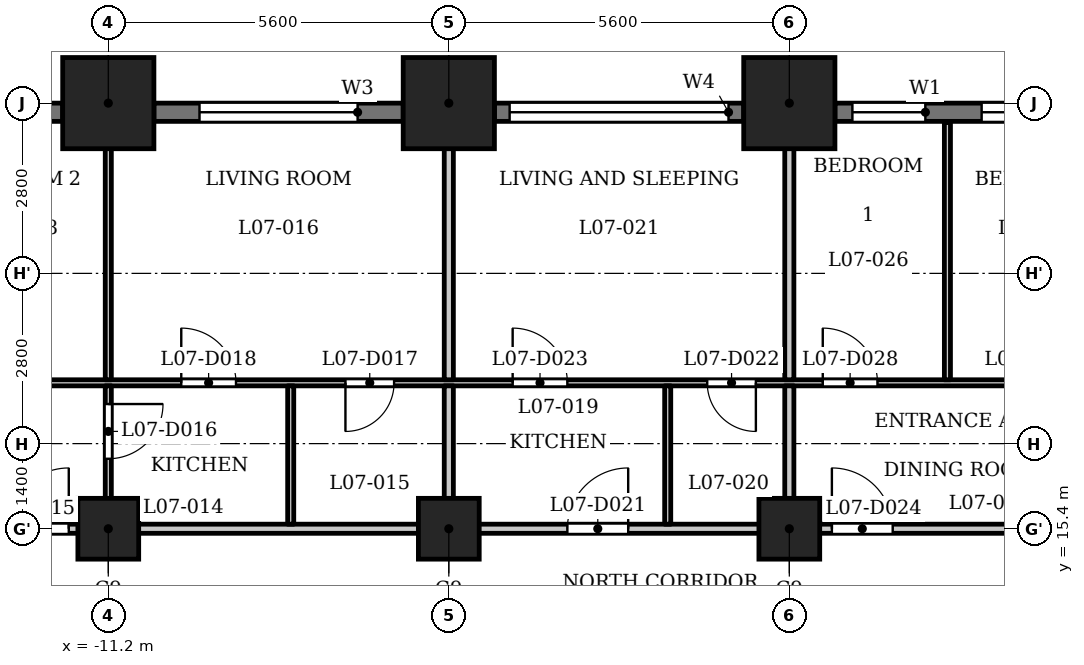
"""IFC4 building model, lengths in metres.
Left out: names, types, materials, properties, quantities, classifications, styles, units other than length and angle.
Written with IfcOpenShell. Run it as: python <this file> out.ifc"""

import sys

from ifc_helpers import new_model, si_unit, direction, frame, frame_2d, origin, origin_2d, place, context, subcontext, project, spatial, rectangle, extrude, element, fill, save


model = new_model("IFC4")
c1 = context("Model", 3, precision=1e-05, world=origin(), true_north=direction((0.0, 1.0)))
c2 = subcontext(c1, "Body", "Model", "MODEL_VIEW")
j1 = project(units=[si_unit("LENGTHUNIT", "METRE"), si_unit("PLANEANGLEUNIT", "RADIAN")], contexts=[c1])
p1 = place(None, origin())
s1 = spatial("IfcSite", under=j1, at=p1, CompositionType="ELEMENT")
p2 = place(p1, origin())
s2 = spatial("IfcBuilding", under=s1, at=p2, CompositionType="ELEMENT")
p3 = place(p2, frame((0.0, 0.0, 34.0)))
s3 = spatial("IfcBuildingStorey", under=s2, at=p3, CompositionType="ELEMENT", Elevation=34.0)
for number, where, z_axis, x_axis in (
    (1, (0.0, 22.4, 0.0), (0.0, 0.0, 1.0), (1.0, 0.0, 0.0)),
    (2, (-5.6, 22.4, 0.0), (0.0, 0.0, 1.0), (1.0, 0.0, 0.0)),
    (3, (-11.2, 22.4, 0.0), (0.0, 0.0, 1.0), (1.0, 0.0, 0.0)),
):
    element("IfcColumn", number, at=place(p3, frame(where, z_axis=z_axis, x_axis=x_axis)), inside=s3, PredefinedType="COLUMN", context=c2, shape_type="SweptSolid", body=[
        extrude(rectangle(XDim=1.5, YDim=1.5, at=origin_2d()), origin(), (0.0, 0.0, 1.0), 3.5),
    ])
for number, where, z_axis, x_axis in (
    (4, (-11.2, 15.4, 0.0), (0.0, 0.0, 1.0), (1.0, 0.0, 0.0)),
    (5, (-5.6, 15.4, 0.0), (0.0, 0.0, 1.0), (1.0, 0.0, 0.0)),
    (6, (0.0, 15.4, 0.0), (0.0, 0.0, 1.0), (1.0, 0.0, 0.0)),
):
    element("IfcColumn", number, at=place(p3, frame(where, z_axis=z_axis, x_axis=x_axis)), inside=s3, PredefinedType="COLUMN", context=c2, shape_type="SweptSolid", body=[
        extrude(rectangle(XDim=1.0, YDim=1.0, at=origin_2d()), origin(), (0.0, 0.0, 1.0), 3.5),
    ])
p4 = place(p3, frame((4.85, 22.25, 0.0), z_axis=(0.0, 0.0, 1.0), x_axis=(-1.0, 0.0, 0.0)))
e7 = element("IfcWall", 7, at=p4, inside=s3, PredefinedType="SOLIDWALL", context=c2, shape_type="SweptSolid", body=[
    extrude(rectangle(XDim=4.1, YDim=0.3, at=frame_2d((2.05, 0.0))), origin(), (0.0, 0.0, 1.0), 2.35),
])
p5 = place(p4, frame((0.488, 0.0, 0.6)))
e8 = element("IfcOpeningElement", 8, at=p5, cuts=e7, PredefinedType="OPENING", context=c2, shape_type="SweptSolid", body=[
    extrude(rectangle(XDim=1.2, YDim=1.55, at=frame_2d((0.6, 0.775))), frame((0.0, 0.16, 0.0), z_axis=(0.0, -1.0, 0.0), x_axis=(1.0, 0.0, 0.0)), (0.0, 0.0, 1.0), 0.32),
])
p6 = place(p4, frame((2.613, 0.0, 0.6)))
e9 = element("IfcOpeningElement", 9, at=p6, cuts=e7, PredefinedType="OPENING", context=c2, shape_type="SweptSolid", body=[
    extrude(rectangle(XDim=1.2, YDim=1.55, at=frame_2d((0.6, 0.775))), frame((0.0, 0.16, 0.0), z_axis=(0.0, -1.0, 0.0), x_axis=(1.0, 0.0, 0.0)), (0.0, 0.0, 1.0), 0.32),
])
p7 = place(p3, frame((-0.75, 22.25, 0.0), z_axis=(0.0, 0.0, 1.0), x_axis=(-1.0, 0.0, 0.0)))
e10 = element("IfcWall", 10, at=p7, inside=s3, PredefinedType="SOLIDWALL", context=c2, shape_type="SweptSolid", body=[
    extrude(rectangle(XDim=4.1, YDim=0.3, at=frame_2d((2.05, 0.0))), origin(), (0.0, 0.0, 1.0), 2.35),
])
p8 = place(p7, frame((0.25, 0.0, 1.2)))
e11 = element("IfcOpeningElement", 11, at=p8, cuts=e10, PredefinedType="OPENING", context=c2, shape_type="SweptSolid", body=[
    extrude(rectangle(XDim=3.6, YDim=0.95, at=frame_2d((1.8, 0.475))), frame((0.0, 0.16, 0.0), z_axis=(0.0, -1.0, 0.0), x_axis=(1.0, 0.0, 0.0)), (0.0, 0.0, 1.0), 0.32),
])
p9 = place(p3, frame((-6.35, 22.25, 0.0), z_axis=(0.0, 0.0, 1.0), x_axis=(-1.0, 0.0, 0.0)))
e12 = element("IfcWall", 12, at=p9, inside=s3, PredefinedType="SOLIDWALL", context=c2, shape_type="SweptSolid", body=[
    extrude(rectangle(XDim=4.1, YDim=0.3, at=frame_2d((2.05, 0.0))), origin(), (0.0, 0.0, 1.0), 2.35),
])
p10 = place(p9, frame((0.75, 0.0, 0.9)))
e13 = element("IfcOpeningElement", 13, at=p10, cuts=e12, PredefinedType="OPENING", context=c2, shape_type="SweptSolid", body=[
    extrude(rectangle(XDim=2.6, YDim=1.25, at=frame_2d((1.3, 0.625))), frame((0.0, 0.16, 0.0), z_axis=(0.0, -1.0, 0.0), x_axis=(1.0, 0.0, 0.0)), (0.0, 0.0, 1.0), 0.32),
])
p11 = place(p3, frame((-11.95, 22.25, 0.0), z_axis=(0.0, 0.0, 1.0), x_axis=(-1.0, 0.0, 0.0)))
e14 = element("IfcWall", 14, at=p11, inside=s3, PredefinedType="SOLIDWALL", context=c2, shape_type="SweptSolid", body=[
    extrude(rectangle(XDim=4.1, YDim=0.3, at=frame_2d((2.05, 0.0))), origin(), (0.0, 0.0, 1.0), 2.35),
])
p12 = place(p11, frame((0.488, 0.0, 0.6)))
e15 = element("IfcOpeningElement", 15, at=p12, cuts=e14, PredefinedType="OPENING", context=c2, shape_type="SweptSolid", body=[
    extrude(rectangle(XDim=1.2, YDim=1.55, at=frame_2d((0.6, 0.775))), frame((0.0, 0.16, 0.0), z_axis=(0.0, -1.0, 0.0), x_axis=(1.0, 0.0, 0.0)), (0.0, 0.0, 1.0), 0.32),
])
p13 = place(p11, frame((2.613, 0.0, 0.6)))
e16 = element("IfcOpeningElement", 16, at=p13, cuts=e14, PredefinedType="OPENING", context=c2, shape_type="SweptSolid", body=[
    extrude(rectangle(XDim=1.2, YDim=1.55, at=frame_2d((0.6, 0.775))), frame((0.0, 0.16, 0.0), z_axis=(0.0, -1.0, 0.0), x_axis=(1.0, 0.0, 0.0)), (0.0, 0.0, 1.0), 0.32),
])
p14 = place(p3, frame((-27.484, 15.4, 0.0), z_axis=(0.0, 0.0, 1.0), x_axis=(1.0, 0.0, 0.0)))
e17 = element("IfcWall", 17, at=p14, inside=s3, PredefinedType="PARTITIONING", context=c2, shape_type="SweptSolid", body=[
    extrude(rectangle(XDim=54.968, YDim=0.15, at=frame_2d((27.484, 0.0))), origin(), (0.0, 0.0, 1.0), 3.2),
])
p15 = place(p14, frame((8.784, 0.0, 0.0)))
e18 = element("IfcOpeningElement", 18, at=p15, cuts=e17, PredefinedType="OPENING", context=c2, shape_type="SweptSolid", body=[
    extrude(rectangle(XDim=1.0, YDim=2.1, at=frame_2d((0.5, 1.05))), frame((0.0, 0.085, 0.0), z_axis=(0.0, -1.0, 0.0), x_axis=(1.0, 0.0, 0.0)), (0.0, 0.0, 1.0), 0.17),
])
p16 = place(p14, frame((14.634, 0.0, 0.0)))
e19 = element("IfcOpeningElement", 19, at=p16, cuts=e17, PredefinedType="OPENING", context=c2, shape_type="SweptSolid", body=[
    extrude(rectangle(XDim=1.0, YDim=2.1, at=frame_2d((0.5, 1.05))), frame((0.0, 0.085, 0.0), z_axis=(0.0, -1.0, 0.0), x_axis=(1.0, 0.0, 0.0)), (0.0, 0.0, 1.0), 0.17),
])
p17 = place(p14, frame((23.834, 0.0, 0.0)))
e20 = element("IfcOpeningElement", 20, at=p17, cuts=e17, PredefinedType="OPENING", context=c2, shape_type="SweptSolid", body=[
    extrude(rectangle(XDim=1.0, YDim=2.1, at=frame_2d((0.5, 1.05))), frame((0.0, 0.085, 0.0), z_axis=(0.0, -1.0, 0.0), x_axis=(1.0, 0.0, 0.0)), (0.0, 0.0, 1.0), 0.17),
])
p18 = place(p14, frame((28.184, 0.0, 0.0)))
e21 = element("IfcOpeningElement", 21, at=p18, cuts=e17, PredefinedType="OPENING", context=c2, shape_type="SweptSolid", body=[
    extrude(rectangle(XDim=1.0, YDim=2.1, at=frame_2d((0.5, 1.05))), frame((0.0, 0.085, 0.0), z_axis=(0.0, -1.0, 0.0), x_axis=(1.0, 0.0, 0.0)), (0.0, 0.0, 1.0), 0.17),
])
p19 = place(p14, frame((41.884, 0.0, 0.0)))
e22 = element("IfcOpeningElement", 22, at=p19, cuts=e17, PredefinedType="OPENING", context=c2, shape_type="SweptSolid", body=[
    extrude(rectangle(XDim=1.0, YDim=2.1, at=frame_2d((0.5, 1.05))), frame((0.0, 0.085, 0.0), z_axis=(0.0, -1.0, 0.0), x_axis=(1.0, 0.0, 0.0)), (0.0, 0.0, 1.0), 0.17),
])
p20 = place(p14, frame((48.234, 0.0, 0.0)))
e23 = element("IfcOpeningElement", 23, at=p20, cuts=e17, PredefinedType="OPENING", context=c2, shape_type="SweptSolid", body=[
    extrude(rectangle(XDim=1.0, YDim=2.1, at=frame_2d((0.5, 1.05))), frame((0.0, 0.085, 0.0), z_axis=(0.0, -1.0, 0.0), x_axis=(1.0, 0.0, 0.0)), (0.0, 0.0, 1.0), 0.17),
])
p21 = place(p3, frame((-26.732, 17.8, 0.0), z_axis=(0.0, 0.0, 1.0), x_axis=(1.0, 0.0, 0.0)))
e24 = element("IfcWall", 24, at=p21, inside=s3, PredefinedType="PARTITIONING", context=c2, shape_type="SweptSolid", body=[
    extrude(rectangle(XDim=53.126, YDim=0.1, at=frame_2d((26.563, 0.0))), origin(), (0.0, 0.0, 1.0), 3.2),
])
p22 = place(p21, frame((2.964, 0.0, 0.0)))
e25 = element("IfcOpeningElement", 25, at=p22, cuts=e24, PredefinedType="OPENING", context=c2, shape_type="SweptSolid", body=[
    extrude(rectangle(XDim=0.8, YDim=2.1, at=frame_2d((0.4, 1.05))), frame((0.0, 0.06, 0.0), z_axis=(0.0, -1.0, 0.0), x_axis=(1.0, 0.0, 0.0)), (0.0, 0.0, 1.0), 0.12),
])
p23 = place(p21, frame((7.132, 0.0, 0.0)))
e26 = element("IfcOpeningElement", 26, at=p23, cuts=e24, PredefinedType="OPENING", context=c2, shape_type="SweptSolid", body=[
    extrude(rectangle(XDim=0.9, YDim=2.1, at=frame_2d((0.45, 1.05))), frame((0.0, 0.06, 0.0), z_axis=(0.0, -1.0, 0.0), x_axis=(1.0, 0.0, 0.0)), (0.0, 0.0, 1.0), 0.12),
])
p24 = place(p21, frame((19.432, 0.0, 0.0)))
e27 = element("IfcOpeningElement", 27, at=p24, cuts=e24, PredefinedType="OPENING", context=c2, shape_type="SweptSolid", body=[
    extrude(rectangle(XDim=0.8, YDim=2.1, at=frame_2d((0.4, 1.05))), frame((0.0, 0.06, 0.0), z_axis=(0.0, -1.0, 0.0), x_axis=(1.0, 0.0, 0.0)), (0.0, 0.0, 1.0), 0.12),
])
p25 = place(p21, frame((16.732, 0.0, 0.0)))
e28 = element("IfcOpeningElement", 28, at=p25, cuts=e24, PredefinedType="OPENING", context=c2, shape_type="SweptSolid", body=[
    extrude(rectangle(XDim=0.9, YDim=2.1, at=frame_2d((0.45, 1.05))), frame((0.0, 0.06, 0.0), z_axis=(0.0, -1.0, 0.0), x_axis=(1.0, 0.0, 0.0)), (0.0, 0.0, 1.0), 0.12),
])
p26 = place(p21, frame((10.982, 0.0, 0.0)))
e29 = element("IfcOpeningElement", 29, at=p26, cuts=e24, PredefinedType="OPENING", context=c2, shape_type="SweptSolid", body=[
    extrude(rectangle(XDim=0.9, YDim=2.1, at=frame_2d((0.45, 1.05))), frame((0.0, 0.06, 0.0), z_axis=(0.0, -1.0, 0.0), x_axis=(1.0, 0.0, 0.0)), (0.0, 0.0, 1.0), 0.12),
])
p27 = place(p21, frame((12.982, 0.0, 0.0)))
e30 = element("IfcOpeningElement", 30, at=p27, cuts=e24, PredefinedType="OPENING", context=c2, shape_type="SweptSolid", body=[
    extrude(rectangle(XDim=0.9, YDim=2.1, at=frame_2d((0.45, 1.05))), frame((0.0, 0.06, 0.0), z_axis=(0.0, -1.0, 0.0), x_axis=(1.0, 0.0, 0.0)), (0.0, 0.0, 1.0), 0.12),
])
p28 = place(p21, frame((25.382, 0.0, 0.0)))
e31 = element("IfcOpeningElement", 31, at=p28, cuts=e24, PredefinedType="OPENING", context=c2, shape_type="SweptSolid", body=[
    extrude(rectangle(XDim=0.8, YDim=2.1, at=frame_2d((0.4, 1.05))), frame((0.0, 0.06, 0.0), z_axis=(0.0, -1.0, 0.0), x_axis=(1.0, 0.0, 0.0)), (0.0, 0.0, 1.0), 0.12),
])
p29 = place(p21, frame((22.182, 0.0, 0.0)))
e32 = element("IfcOpeningElement", 32, at=p29, cuts=e24, PredefinedType="OPENING", context=c2, shape_type="SweptSolid", body=[
    extrude(rectangle(XDim=0.9, YDim=2.1, at=frame_2d((0.45, 1.05))), frame((0.0, 0.06, 0.0), z_axis=(0.0, -1.0, 0.0), x_axis=(1.0, 0.0, 0.0)), (0.0, 0.0, 1.0), 0.12),
])
p30 = place(p21, frame((36.232, 0.0, 0.0)))
e33 = element("IfcOpeningElement", 33, at=p30, cuts=e24, PredefinedType="OPENING", context=c2, shape_type="SweptSolid", body=[
    extrude(rectangle(XDim=0.8, YDim=2.1, at=frame_2d((0.4, 1.05))), frame((0.0, 0.06, 0.0), z_axis=(0.0, -1.0, 0.0), x_axis=(1.0, 0.0, 0.0)), (0.0, 0.0, 1.0), 0.12),
])
p31 = place(p21, frame((33.782, 0.0, 0.0)))
e34 = element("IfcOpeningElement", 34, at=p31, cuts=e24, PredefinedType="OPENING", context=c2, shape_type="SweptSolid", body=[
    extrude(rectangle(XDim=0.9, YDim=2.1, at=frame_2d((0.45, 1.05))), frame((0.0, 0.06, 0.0), z_axis=(0.0, -1.0, 0.0), x_axis=(1.0, 0.0, 0.0)), (0.0, 0.0, 1.0), 0.12),
])
p32 = place(p21, frame((27.282, 0.0, 0.0)))
e35 = element("IfcOpeningElement", 35, at=p32, cuts=e24, PredefinedType="OPENING", context=c2, shape_type="SweptSolid", body=[
    extrude(rectangle(XDim=0.9, YDim=2.1, at=frame_2d((0.45, 1.05))), frame((0.0, 0.06, 0.0), z_axis=(0.0, -1.0, 0.0), x_axis=(1.0, 0.0, 0.0)), (0.0, 0.0, 1.0), 0.12),
])
p33 = place(p21, frame((30.282, 0.0, 0.0)))
e36 = element("IfcOpeningElement", 36, at=p33, cuts=e24, PredefinedType="OPENING", context=c2, shape_type="SweptSolid", body=[
    extrude(rectangle(XDim=0.9, YDim=2.1, at=frame_2d((0.45, 1.05))), frame((0.0, 0.06, 0.0), z_axis=(0.0, -1.0, 0.0), x_axis=(1.0, 0.0, 0.0)), (0.0, 0.0, 1.0), 0.12),
])
p34 = place(p21, frame((38.582, 0.0, 0.0)))
e37 = element("IfcOpeningElement", 37, at=p34, cuts=e24, PredefinedType="OPENING", context=c2, shape_type="SweptSolid", body=[
    extrude(rectangle(XDim=0.8, YDim=2.1, at=frame_2d((0.4, 1.05))), frame((0.0, 0.06, 0.0), z_axis=(0.0, -1.0, 0.0), x_axis=(1.0, 0.0, 0.0)), (0.0, 0.0, 1.0), 0.12),
])
p35 = place(p21, frame((41.232, 0.0, 0.0)))
e38 = element("IfcOpeningElement", 38, at=p35, cuts=e24, PredefinedType="OPENING", context=c2, shape_type="SweptSolid", body=[
    extrude(rectangle(XDim=0.9, YDim=2.1, at=frame_2d((0.45, 1.05))), frame((0.0, 0.06, 0.0), z_axis=(0.0, -1.0, 0.0), x_axis=(1.0, 0.0, 0.0)), (0.0, 0.0, 1.0), 0.12),
])
p36 = place(p21, frame((51.532, 0.0, 0.0)))
e39 = element("IfcOpeningElement", 39, at=p36, cuts=e24, PredefinedType="OPENING", context=c2, shape_type="SweptSolid", body=[
    extrude(rectangle(XDim=0.8, YDim=2.1, at=frame_2d((0.4, 1.05))), frame((0.0, 0.06, 0.0), z_axis=(0.0, -1.0, 0.0), x_axis=(1.0, 0.0, 0.0)), (0.0, 0.0, 1.0), 0.12),
])
p37 = place(p21, frame((46.582, 0.0, 0.0)))
e40 = element("IfcOpeningElement", 40, at=p37, cuts=e24, PredefinedType="OPENING", context=c2, shape_type="SweptSolid", body=[
    extrude(rectangle(XDim=0.9, YDim=2.1, at=frame_2d((0.45, 1.05))), frame((0.0, 0.06, 0.0), z_axis=(0.0, -1.0, 0.0), x_axis=(1.0, 0.0, 0.0)), (0.0, 0.0, 1.0), 0.12),
])
p38 = place(p3, frame((-11.2, 15.475, 0.0), z_axis=(0.0, 0.0, 1.0), x_axis=(0.0, 1.0, 0.0)))
e41 = element("IfcWall", 41, at=p38, inside=s3, PredefinedType="PARTITIONING", context=c2, shape_type="SweptSolid", body=[
    extrude(rectangle(XDim=2.275, YDim=0.1, at=frame_2d((1.137, 0.0))), origin(), (0.0, 0.0, 1.0), 3.2),
])
p39 = place(p38, frame((1.076, 0.0, 0.0)))
e42 = element("IfcOpeningElement", 42, at=p39, cuts=e41, PredefinedType="OPENING", context=c2, shape_type="SweptSolid", body=[
    extrude(rectangle(XDim=0.9, YDim=2.1, at=frame_2d((0.45, 1.05))), frame((0.0, 0.06, 0.0), z_axis=(0.0, -1.0, 0.0), x_axis=(1.0, 0.0, 0.0)), (0.0, 0.0, 1.0), 0.12),
])
p40 = place(p3, frame((-11.2, 17.85, 0.0), z_axis=(0.0, 0.0, 1.0), x_axis=(0.0, 1.0, 0.0)))
e43 = element("IfcWall", 43, at=p40, inside=s3, PredefinedType="PARTITIONING", context=c2, shape_type="SweptSolid", body=[
    extrude(rectangle(XDim=5.28, YDim=0.1, at=frame_2d((2.64, 0.0))), origin(), (0.0, 0.0, 1.0), 3.2),
])
p41 = place(p3, frame((-8.2, 15.475, 0.0), z_axis=(0.0, 0.0, 1.0), x_axis=(0.0, 1.0, 0.0)))
e44 = element("IfcWall", 44, at=p41, inside=s3, PredefinedType="PARTITIONING", context=c2, shape_type="SweptSolid", body=[
    extrude(rectangle(XDim=2.275, YDim=0.1, at=frame_2d((1.137, 0.0))), origin(), (0.0, 0.0, 1.0), 3.2),
])
p42 = place(p3, frame((-5.6, 15.475, 0.0), z_axis=(0.0, 0.0, 1.0), x_axis=(0.0, 1.0, 0.0)))
e45 = element("IfcWall", 45, at=p42, inside=s3, PredefinedType="PARTITIONING", context=c2, shape_type="SweptSolid", body=[
    extrude(rectangle(XDim=2.275, YDim=0.15, at=frame_2d((1.137, 0.0))), origin(), (0.0, 0.0, 1.0), 3.2),
])
p43 = place(p3, frame((-5.6, 17.85, 0.0), z_axis=(0.0, 0.0, 1.0), x_axis=(0.0, 1.0, 0.0)))
e46 = element("IfcWall", 46, at=p43, inside=s3, PredefinedType="PARTITIONING", context=c2, shape_type="SweptSolid", body=[
    extrude(rectangle(XDim=5.28, YDim=0.15, at=frame_2d((2.64, 0.0))), origin(), (0.0, 0.0, 1.0), 3.2),
])
p44 = place(p3, frame((-2.0, 15.475, 0.0), z_axis=(0.0, 0.0, 1.0), x_axis=(0.0, 1.0, 0.0)))
e47 = element("IfcWall", 47, at=p44, inside=s3, PredefinedType="PARTITIONING", context=c2, shape_type="SweptSolid", body=[
    extrude(rectangle(XDim=2.275, YDim=0.1, at=frame_2d((1.137, 0.0))), origin(), (0.0, 0.0, 1.0), 3.2),
])
p45 = place(p3, frame((0.0, 15.475, 0.0), z_axis=(0.0, 0.0, 1.0), x_axis=(0.0, 1.0, 0.0)))
e48 = element("IfcWall", 48, at=p45, inside=s3, PredefinedType="PARTITIONING", context=c2, shape_type="SweptSolid", body=[
    extrude(rectangle(XDim=2.275, YDim=0.15, at=frame_2d((1.137, 0.0))), origin(), (0.0, 0.0, 1.0), 3.2),
])
p46 = place(p3, frame((0.0, 17.85, 0.0), z_axis=(0.0, 0.0, 1.0), x_axis=(0.0, 1.0, 0.0)))
e49 = element("IfcWall", 49, at=p46, inside=s3, PredefinedType="PARTITIONING", context=c2, shape_type="SweptSolid", body=[
    extrude(rectangle(XDim=5.28, YDim=0.15, at=frame_2d((2.64, 0.0))), origin(), (0.0, 0.0, 1.0), 3.2),
])
p47 = place(p3, frame((2.6, 17.85, 0.0), z_axis=(0.0, 0.0, 1.0), x_axis=(0.0, 1.0, 0.0)))
e50 = element("IfcWall", 50, at=p47, inside=s3, PredefinedType="PARTITIONING", context=c2, shape_type="SweptSolid", body=[
    extrude(rectangle(XDim=4.23, YDim=0.1, at=frame_2d((2.115, 0.0))), origin(), (0.0, 0.0, 1.0), 3.2),
])
p48 = place(p16, origin())
e51 = element("IfcDoor", 51, at=p48, inside=s3, OperationType="SINGLE_SWING_LEFT", PredefinedType="DOOR", context=c2, shape_type="SweptSolid", body=[
    extrude(rectangle(XDim=1.0, YDim=2.1, at=frame_2d((0.5, 1.05))), frame((0.0, 0.025, 0.0), z_axis=(0.0, -1.0, 0.0), x_axis=(1.0, 0.0, 0.0)), (0.0, 0.0, 1.0), 0.05),
])
fill(e19, e51)
p49 = place(p39, origin())
e52 = element("IfcDoor", 52, at=p49, inside=s3, OperationType="SINGLE_SWING_RIGHT", PredefinedType="DOOR", context=c2, shape_type="SweptSolid", body=[
    extrude(rectangle(XDim=0.9, YDim=2.1, at=frame_2d((0.45, 1.05))), frame((0.0, 0.025, 0.0), z_axis=(0.0, -1.0, 0.0), x_axis=(1.0, 0.0, 0.0)), (0.0, 0.0, 1.0), 0.05),
])
fill(e42, e52)
p50 = place(p24, origin())
e53 = element("IfcDoor", 53, at=p50, inside=s3, OperationType="SINGLE_SWING_LEFT", PredefinedType="DOOR", context=c2, shape_type="SweptSolid", body=[
    extrude(rectangle(XDim=0.8, YDim=2.1, at=frame_2d((0.4, 1.05))), frame((0.0, 0.025, 0.0), z_axis=(0.0, -1.0, 0.0), x_axis=(1.0, 0.0, 0.0)), (0.0, 0.0, 1.0), 0.05),
])
fill(e27, e53)
p51 = place(p25, origin())
e54 = element("IfcDoor", 54, at=p51, inside=s3, OperationType="SINGLE_SWING_RIGHT", PredefinedType="DOOR", context=c2, shape_type="SweptSolid", body=[
    extrude(rectangle(XDim=0.9, YDim=2.1, at=frame_2d((0.45, 1.05))), frame((0.0, 0.025, 0.0), z_axis=(0.0, -1.0, 0.0), x_axis=(1.0, 0.0, 0.0)), (0.0, 0.0, 1.0), 0.05),
])
fill(e28, e54)
p52 = place(p17, origin())
e55 = element("IfcDoor", 55, at=p52, inside=s3, OperationType="SINGLE_SWING_LEFT", PredefinedType="DOOR", context=c2, shape_type="SweptSolid", body=[
    extrude(rectangle(XDim=1.0, YDim=2.1, at=frame_2d((0.5, 1.05))), frame((0.0, 0.025, 0.0), z_axis=(0.0, -1.0, 0.0), x_axis=(1.0, 0.0, 0.0)), (0.0, 0.0, 1.0), 0.05),
])
fill(e20, e55)
p53 = place(p28, origin())
e56 = element("IfcDoor", 56, at=p53, inside=s3, OperationType="SINGLE_SWING_RIGHT", PredefinedType="DOOR", context=c2, shape_type="SweptSolid", body=[
    extrude(rectangle(XDim=0.8, YDim=2.1, at=frame_2d((0.4, 1.05))), frame((0.0, 0.025, 0.0), z_axis=(0.0, -1.0, 0.0), x_axis=(1.0, 0.0, 0.0)), (0.0, 0.0, 1.0), 0.05),
])
fill(e31, e56)
p54 = place(p29, origin())
e57 = element("IfcDoor", 57, at=p54, inside=s3, OperationType="SINGLE_SWING_RIGHT", PredefinedType="DOOR", context=c2, shape_type="SweptSolid", body=[
    extrude(rectangle(XDim=0.9, YDim=2.1, at=frame_2d((0.45, 1.05))), frame((0.0, 0.025, 0.0), z_axis=(0.0, -1.0, 0.0), x_axis=(1.0, 0.0, 0.0)), (0.0, 0.0, 1.0), 0.05),
])
fill(e32, e57)
p55 = place(p18, origin())
e58 = element("IfcDoor", 58, at=p55, inside=s3, OperationType="SINGLE_SWING_RIGHT", PredefinedType="DOOR", context=c2, shape_type="SweptSolid", body=[
    extrude(rectangle(XDim=1.0, YDim=2.1, at=frame_2d((0.5, 1.05))), frame((0.0, 0.025, 0.0), z_axis=(0.0, -1.0, 0.0), x_axis=(1.0, 0.0, 0.0)), (0.0, 0.0, 1.0), 0.05),
])
fill(e21, e58)
p56 = place(p32, origin())
e59 = element("IfcDoor", 59, at=p56, inside=s3, OperationType="SINGLE_SWING_RIGHT", PredefinedType="DOOR", context=c2, shape_type="SweptSolid", body=[
    extrude(rectangle(XDim=0.9, YDim=2.1, at=frame_2d((0.45, 1.05))), frame((0.0, 0.025, 0.0), z_axis=(0.0, -1.0, 0.0), x_axis=(1.0, 0.0, 0.0)), (0.0, 0.0, 1.0), 0.05),
])
fill(e35, e59)
p57 = place(p5, origin())
e60 = element("IfcWindow", 60, at=p57, inside=s3, PartitioningType="SINGLE_PANEL", PredefinedType="WINDOW", context=c2, shape_type="SweptSolid", body=[
    extrude(rectangle(XDim=1.2, YDim=1.55, at=frame_2d((0.6, 0.775))), frame((0.0, 0.03, 0.0), z_axis=(0.0, -1.0, 0.0), x_axis=(1.0, 0.0, 0.0)), (0.0, 0.0, 1.0), 0.06),
])
fill(e8, e60)
p58 = place(p6, origin())
e61 = element("IfcWindow", 61, at=p58, inside=s3, PartitioningType="SINGLE_PANEL", PredefinedType="WINDOW", context=c2, shape_type="SweptSolid", body=[
    extrude(rectangle(XDim=1.2, YDim=1.55, at=frame_2d((0.6, 0.775))), frame((0.0, 0.03, 0.0), z_axis=(0.0, -1.0, 0.0), x_axis=(1.0, 0.0, 0.0)), (0.0, 0.0, 1.0), 0.06),
])
fill(e9, e61)
p59 = place(p8, origin())
e62 = element("IfcWindow", 62, at=p59, inside=s3, PartitioningType="SINGLE_PANEL", PredefinedType="WINDOW", context=c2, shape_type="SweptSolid", body=[
    extrude(rectangle(XDim=3.6, YDim=0.95, at=frame_2d((1.8, 0.475))), frame((0.0, 0.03, 0.0), z_axis=(0.0, -1.0, 0.0), x_axis=(1.0, 0.0, 0.0)), (0.0, 0.0, 1.0), 0.06),
])
fill(e11, e62)
p60 = place(p10, origin())
e63 = element("IfcWindow", 63, at=p60, inside=s3, PartitioningType="SINGLE_PANEL", PredefinedType="WINDOW", context=c2, shape_type="SweptSolid", body=[
    extrude(rectangle(XDim=2.6, YDim=1.25, at=frame_2d((1.3, 0.625))), frame((0.0, 0.03, 0.0), z_axis=(0.0, -1.0, 0.0), x_axis=(1.0, 0.0, 0.0)), (0.0, 0.0, 1.0), 0.06),
])
fill(e13, e63)
save(model, sys.argv[1])
